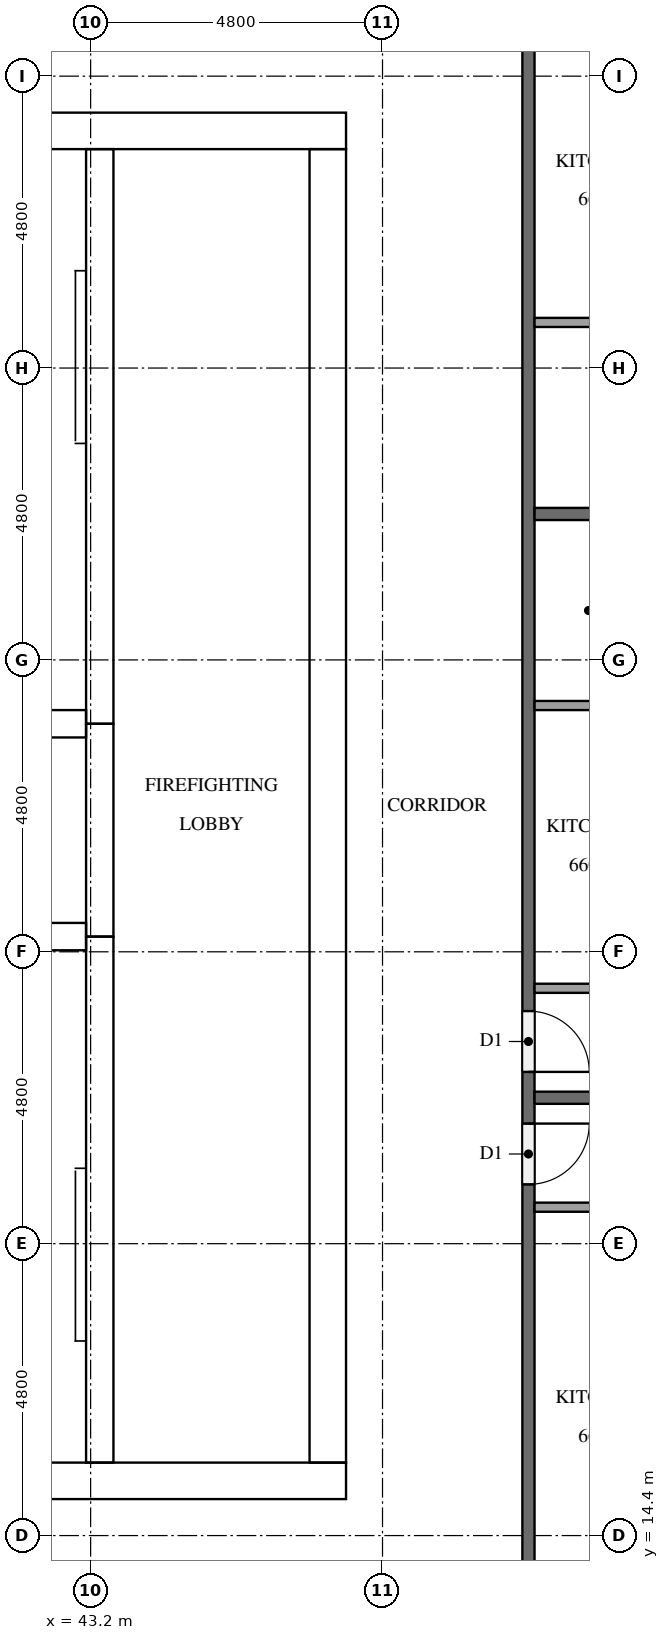
"""IFC4 building model, lengths in metres.
Left out: names, types, materials, properties, quantities, classifications, styles, units other than length and angle.
Written with IfcOpenShell. Run it as: python <this file> out.ifc"""

import sys

from ifc_helpers import new_model, si_unit, direction, frame, frame_2d, origin, place, context, subcontext, project, spatial, rectangle, extrude, element, fill, save


model = new_model("IFC4")
c1 = context("Model", 3, precision=1e-05, world=origin(), true_north=direction((0.0, 1.0)))
c2 = subcontext(c1, "Body", "Model", "MODEL_VIEW")
j1 = project(units=[si_unit("LENGTHUNIT", "METRE"), si_unit("PLANEANGLEUNIT", "RADIAN")], contexts=[c1])
p1 = place(None, origin())
s1 = spatial("IfcSite", under=j1, at=p1, CompositionType="ELEMENT")
p2 = place(p1, origin())
s2 = spatial("IfcBuilding", under=s1, at=p2, CompositionType="ELEMENT")
p3 = place(p2, frame((0.0, 0.0, 252.7)))
s3 = spatial("IfcBuildingStorey", under=s2, at=p3, CompositionType="ELEMENT", Elevation=252.7)
p4 = place(p3, frame((15.0, 15.3, 0.0), z_axis=(0.0, 0.0, 1.0), x_axis=(1.0, 0.0, 0.0)))
e1 = element("IfcWall", 1, at=p4, inside=s3, PredefinedType="SHEAR", context=c2, shape_type="SweptSolid", body=[
    extrude(rectangle(XDim=32.4, YDim=0.6, at=frame_2d((16.2, 0.0))), origin(), (0.0, 0.0, 1.0), 3.2),
])
p5 = place(p4, frame((15.3, 0.0, 0.0)))
e2 = element("IfcOpeningElement", 2, at=p5, cuts=e1, PredefinedType="OPENING", context=c2, shape_type="SweptSolid", body=[
    extrude(rectangle(XDim=1.8, YDim=2.1, at=frame_2d((0.9, 1.05))), frame((0.0, 0.31, 0.0), z_axis=(0.0, -1.0, 0.0), x_axis=(1.0, 0.0, 0.0)), (0.0, 0.0, 1.0), 0.62),
])
p6 = place(p3, frame((15.0, 37.5, 0.0), z_axis=(0.0, 0.0, 1.0), x_axis=(1.0, 0.0, 0.0)))
e3 = element("IfcWall", 3, at=p6, inside=s3, PredefinedType="SHEAR", context=c2, shape_type="SweptSolid", body=[
    extrude(rectangle(XDim=32.4, YDim=0.6, at=frame_2d((16.2, 0.0))), origin(), (0.0, 0.0, 1.0), 3.2),
])
p7 = place(p6, frame((15.3, 0.0, 0.0)))
e4 = element("IfcOpeningElement", 4, at=p7, cuts=e3, PredefinedType="OPENING", context=c2, shape_type="SweptSolid", body=[
    extrude(rectangle(XDim=1.8, YDim=2.1, at=frame_2d((0.9, 1.05))), frame((0.0, 0.31, 0.0), z_axis=(0.0, -1.0, 0.0), x_axis=(1.0, 0.0, 0.0)), (0.0, 0.0, 1.0), 0.62),
])
p8 = place(p6, frame((1.25, 0.0, 0.0)))
e5 = element("IfcOpeningElement", 5, at=p8, cuts=e3, PredefinedType="OPENING", context=c2, shape_type="SweptSolid", body=[
    extrude(rectangle(XDim=1.0, YDim=2.1, at=frame_2d((0.5, 1.05))), frame((0.0, 0.31, 0.0), z_axis=(0.0, -1.0, 0.0), x_axis=(1.0, 0.0, 0.0)), (0.0, 0.0, 1.0), 0.62),
])
p9 = place(p6, frame((4.988, 0.0, 0.0)))
e6 = element("IfcOpeningElement", 6, at=p9, cuts=e3, PredefinedType="OPENING", context=c2, shape_type="SweptSolid", body=[
    extrude(rectangle(XDim=1.0, YDim=2.1, at=frame_2d((0.5, 1.05))), frame((0.0, 0.31, 0.0), z_axis=(0.0, -1.0, 0.0), x_axis=(1.0, 0.0, 0.0)), (0.0, 0.0, 1.0), 0.62),
])
p10 = place(p3, frame((47.1, 15.6, 0.0), z_axis=(0.0, 0.0, 1.0), x_axis=(0.0, 1.0, 0.0)))
e7 = element("IfcWall", 7, at=p10, inside=s3, PredefinedType="SHEAR", context=c2, shape_type="SweptSolid", body=[
    extrude(rectangle(XDim=21.6, YDim=0.6, at=frame_2d((10.8, 0.0))), origin(), (0.0, 0.0, 1.0), 3.2),
])
p11 = place(p10, frame((10.5, 0.0, 0.0)))
e8 = element("IfcOpeningElement", 8, at=p11, cuts=e7, PredefinedType="OPENING", context=c2, shape_type="SweptSolid", body=[
    extrude(rectangle(XDim=1.2, YDim=2.1, at=frame_2d((0.6, 1.05))), frame((0.0, 0.31, 0.0), z_axis=(0.0, -1.0, 0.0), x_axis=(1.0, 0.0, 0.0)), (0.0, 0.0, 1.0), 0.62),
])
p12 = place(p3, frame((43.35, 15.6, 0.0), z_axis=(0.0, 0.0, 1.0), x_axis=(0.0, 1.0, 0.0)))
e9 = element("IfcWall", 9, at=p12, inside=s3, PredefinedType="SHEAR", context=c2, shape_type="SweptSolid", body=[
    extrude(rectangle(XDim=8.65, YDim=0.45, at=frame_2d((4.325, 0.0))), origin(), (0.0, 0.0, 1.0), 3.2),
])
p13 = place(p12, frame((0.6, 0.0, 0.0)))
e10 = element("IfcOpeningElement", 10, at=p13, cuts=e9, PredefinedType="OPENING", context=c2, shape_type="SweptSolid", body=[
    extrude(rectangle(XDim=1.2, YDim=2.1, at=frame_2d((0.6, 1.05))), frame((0.0, 0.235, 0.0), z_axis=(0.0, -1.0, 0.0), x_axis=(1.0, 0.0, 0.0)), (0.0, 0.0, 1.0), 0.47),
])
p14 = place(p3, frame((43.35, 24.25, 0.0), z_axis=(0.0, 0.0, 1.0), x_axis=(0.0, 1.0, 0.0)))
e11 = element("IfcWall", 11, at=p14, inside=s3, PredefinedType="SHEAR", context=c2, shape_type="SweptSolid", body=[
    extrude(rectangle(XDim=3.5, YDim=0.45, at=frame_2d((1.75, 0.0))), origin(), (0.0, 0.0, 1.0), 3.2),
])
p15 = place(p14, frame((1.2, 0.0, 0.0)))
e12 = element("IfcOpeningElement", 12, at=p15, cuts=e11, PredefinedType="OPENING", context=c2, shape_type="SweptSolid", body=[
    extrude(rectangle(XDim=1.1, YDim=2.1, at=frame_2d((0.55, 1.05))), frame((0.0, 0.235, 0.0), z_axis=(0.0, -1.0, 0.0), x_axis=(1.0, 0.0, 0.0)), (0.0, 0.0, 1.0), 0.47),
])
p16 = place(p3, frame((43.35, 27.75, 0.0), z_axis=(0.0, 0.0, 1.0), x_axis=(0.0, 1.0, 0.0)))
e13 = element("IfcWall", 13, at=p16, inside=s3, PredefinedType="SHEAR", context=c2, shape_type="SweptSolid", body=[
    extrude(rectangle(XDim=9.45, YDim=0.45, at=frame_2d((4.725, 0.0))), origin(), (0.0, 0.0, 1.0), 3.2),
])
p17 = place(p16, frame((7.65, 0.0, 0.0)))
e14 = element("IfcOpeningElement", 14, at=p17, cuts=e13, PredefinedType="OPENING", context=c2, shape_type="SweptSolid", body=[
    extrude(rectangle(XDim=1.2, YDim=2.1, at=frame_2d((0.6, 1.05))), frame((0.0, 0.235, 0.0), z_axis=(0.0, -1.0, 0.0), x_axis=(1.0, 0.0, 0.0)), (0.0, 0.0, 1.0), 0.47),
])
for number, where, z_axis, x_axis in (
    (15, (39.525, 24.25, 0.0), (0.0, 0.0, 1.0), (1.0, 0.0, 0.0)),
    (16, (39.525, 27.75, 0.0), (0.0, 0.0, 1.0), (1.0, 0.0, 0.0)),
):
    element("IfcWall", number, at=place(p3, frame(where, z_axis=z_axis, x_axis=x_axis)), inside=s3, PredefinedType="SHEAR", context=c2, shape_type="SweptSolid", body=[
        extrude(rectangle(XDim=3.6, YDim=0.45, at=frame_2d((1.8, 0.0))), origin(), (0.0, 0.0, 1.0), 3.2),
    ])
p18 = place(p3, frame((50.4, 40.7, 0.0), z_axis=(0.0, 0.0, 1.0), x_axis=(0.0, -1.0, 0.0)))
e17 = element("IfcWall", 17, at=p18, inside=s3, PredefinedType="PARTITIONING", context=c2, shape_type="SweptSolid", body=[
    extrude(rectangle(XDim=28.6, YDim=0.2, at=frame_2d((14.3, 0.0))), origin(), (0.0, 0.0, 1.0), 3.2),
])
p19 = place(p18, frame((19.525, 0.0, 0.0)))
e18 = element("IfcOpeningElement", 18, at=p19, cuts=e17, PredefinedType="OPENING", context=c2, shape_type="SweptSolid", body=[
    extrude(rectangle(XDim=1.0, YDim=2.1, at=frame_2d((0.5, 1.05))), frame((0.0, 0.11, 0.0), z_axis=(0.0, -1.0, 0.0), x_axis=(1.0, 0.0, 0.0)), (0.0, 0.0, 1.0), 0.22),
])
p20 = place(p18, frame((17.675, 0.0, 0.0)))
e19 = element("IfcOpeningElement", 19, at=p20, cuts=e17, PredefinedType="OPENING", context=c2, shape_type="SweptSolid", body=[
    extrude(rectangle(XDim=1.0, YDim=2.1, at=frame_2d((0.5, 1.05))), frame((0.0, 0.11, 0.0), z_axis=(0.0, -1.0, 0.0), x_axis=(1.0, 0.0, 0.0)), (0.0, 0.0, 1.0), 0.22),
])
p21 = place(p18, frame((0.325, 0.0, 0.0)))
e20 = element("IfcOpeningElement", 20, at=p21, cuts=e17, PredefinedType="OPENING", context=c2, shape_type="SweptSolid", body=[
    extrude(rectangle(XDim=1.0, YDim=2.1, at=frame_2d((0.5, 1.05))), frame((0.0, 0.11, 0.0), z_axis=(0.0, -1.0, 0.0), x_axis=(1.0, 0.0, 0.0)), (0.0, 0.0, 1.0), 0.22),
])
for number, where, z_axis, x_axis in (
    (21, (50.5, 21.6, 0.0), (0.0, 0.0, 1.0), (1.0, 0.0, 0.0)),
    (22, (50.5, 31.2, 0.0), (0.0, 0.0, 1.0), (1.0, 0.0, 0.0)),
):
    element("IfcWall", number, at=place(p3, frame(where, z_axis=z_axis, x_axis=x_axis)), inside=s3, PredefinedType="PARTITIONING", context=c2, shape_type="SweptSolid", body=[
        extrude(rectangle(XDim=7.0, YDim=0.2, at=frame_2d((3.5, 0.0))), origin(), (0.0, 0.0, 1.0), 3.2),
    ])
p22 = place(p3, frame((50.5, 19.8, 0.0), z_axis=(0.0, 0.0, 1.0), x_axis=(1.0, 0.0, 0.0)))
e23 = element("IfcWall", 23, at=p22, inside=s3, PredefinedType="PARTITIONING", context=c2, shape_type="SweptSolid", body=[
    extrude(rectangle(XDim=2.225, YDim=0.15, at=frame_2d((1.113, 0.0))), origin(), (0.0, 0.0, 1.0), 3.2),
])
p23 = place(p3, frame((50.5, 28.05, 0.0), z_axis=(0.0, 0.0, 1.0), x_axis=(1.0, 0.0, 0.0)))
e24 = element("IfcWall", 24, at=p23, inside=s3, PredefinedType="PARTITIONING", context=c2, shape_type="SweptSolid", body=[
    extrude(rectangle(XDim=1.775, YDim=0.15, at=frame_2d((0.887, 0.0))), origin(), (0.0, 0.0, 1.0), 3.2),
])
p24 = place(p3, frame((50.5, 23.4, 0.0), z_axis=(0.0, 0.0, 1.0), x_axis=(1.0, 0.0, 0.0)))
e25 = element("IfcWall", 25, at=p24, inside=s3, PredefinedType="PARTITIONING", context=c2, shape_type="SweptSolid", body=[
    extrude(rectangle(XDim=1.925, YDim=0.15, at=frame_2d((0.962, 0.0))), origin(), (0.0, 0.0, 1.0), 3.2),
])
p25 = place(p3, frame((50.5, 34.35, 0.0), z_axis=(0.0, 0.0, 1.0), x_axis=(1.0, 0.0, 0.0)))
e26 = element("IfcWall", 26, at=p25, inside=s3, PredefinedType="PARTITIONING", context=c2, shape_type="SweptSolid", body=[
    extrude(rectangle(XDim=2.075, YDim=0.15, at=frame_2d((1.038, 0.0))), origin(), (0.0, 0.0, 1.0), 3.2),
])
p26 = place(p15, origin())
e27 = element("IfcDoor", 27, at=p26, inside=s3, OperationType="DOUBLE_DOOR_SLIDING", PredefinedType="DOOR", context=c2, shape_type="SweptSolid", body=[
    extrude(rectangle(XDim=1.1, YDim=2.1, at=frame_2d((0.55, 1.05))), frame((0.0, 0.025, 0.0), z_axis=(0.0, -1.0, 0.0), x_axis=(1.0, 0.0, 0.0)), (0.0, 0.0, 1.0), 0.05),
])
fill(e12, e27)
p27 = place(p13, origin())
e28 = element("IfcDoor", 28, at=p27, inside=s3, OperationType="SINGLE_SWING_LEFT", PredefinedType="DOOR", context=c2, shape_type="SweptSolid", body=[
    extrude(rectangle(XDim=1.2, YDim=2.1, at=frame_2d((0.6, 1.05))), frame((0.0, 0.025, 0.0), z_axis=(0.0, -1.0, 0.0), x_axis=(1.0, 0.0, 0.0)), (0.0, 0.0, 1.0), 0.05),
])
fill(e10, e28)
p28 = place(p17, origin())
e29 = element("IfcDoor", 29, at=p28, inside=s3, OperationType="SINGLE_SWING_RIGHT", PredefinedType="DOOR", context=c2, shape_type="SweptSolid", body=[
    extrude(rectangle(XDim=1.2, YDim=2.1, at=frame_2d((0.6, 1.05))), frame((0.0, 0.025, 0.0), z_axis=(0.0, -1.0, 0.0), x_axis=(1.0, 0.0, 0.0)), (0.0, 0.0, 1.0), 0.05),
])
fill(e14, e29)
p29 = place(p11, origin())
e30 = element("IfcDoor", 30, at=p29, inside=s3, OperationType="SINGLE_SWING_RIGHT", PredefinedType="DOOR", context=c2, shape_type="SweptSolid", body=[
    extrude(rectangle(XDim=1.2, YDim=2.1, at=frame_2d((0.6, 1.05))), frame((0.0, 0.025, 0.0), z_axis=(0.0, -1.0, 0.0), x_axis=(1.0, 0.0, 0.0)), (0.0, 0.0, 1.0), 0.05),
])
fill(e8, e30)
p30 = place(p19, origin())
e31 = element("IfcDoor", 31, at=p30, inside=s3, OperationType="SINGLE_SWING_LEFT", PredefinedType="DOOR", context=c2, shape_type="SweptSolid", body=[
    extrude(rectangle(XDim=1.0, YDim=2.1, at=frame_2d((0.5, 1.05))), frame((0.0, 0.025, 0.0), z_axis=(0.0, -1.0, 0.0), x_axis=(1.0, 0.0, 0.0)), (0.0, 0.0, 1.0), 0.05),
])
fill(e18, e31)
p31 = place(p20, origin())
e32 = element("IfcDoor", 32, at=p31, inside=s3, OperationType="SINGLE_SWING_RIGHT", PredefinedType="DOOR", context=c2, shape_type="SweptSolid", body=[
    extrude(rectangle(XDim=1.0, YDim=2.1, at=frame_2d((0.5, 1.05))), frame((0.0, 0.025, 0.0), z_axis=(0.0, -1.0, 0.0), x_axis=(1.0, 0.0, 0.0)), (0.0, 0.0, 1.0), 0.05),
])
fill(e19, e32)
save(model, sys.argv[1])
